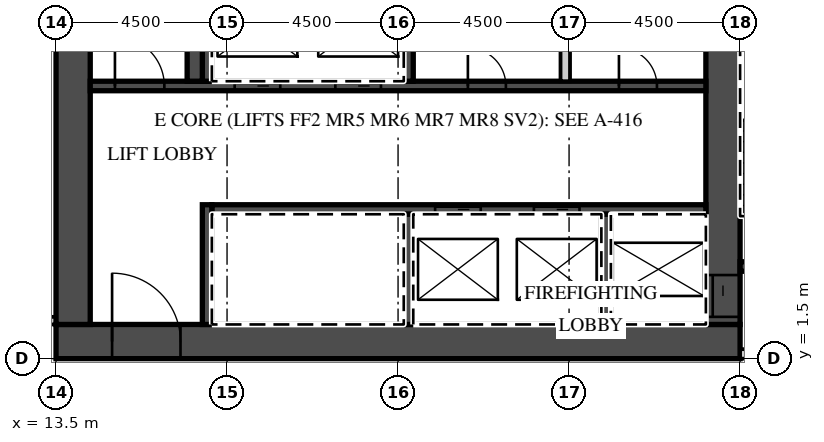
"""IFC4 building model, lengths in metres.
Left out: names, types, materials, properties, quantities, classifications, styles, units other than length and angle.
Written with IfcOpenShell. Run it as: python <this file> out.ifc"""

import sys

from ifc_helpers import new_model, si_unit, direction, frame, frame_2d, origin, place, context, subcontext, project, spatial, rectangle, extrude, element, fill, save


model = new_model("IFC4")
c1 = context("Model", 3, precision=1e-05, world=origin(), true_north=direction((0.0, 1.0)))
c2 = subcontext(c1, "Body", "Model", "MODEL_VIEW")
j1 = project(units=[si_unit("LENGTHUNIT", "METRE"), si_unit("PLANEANGLEUNIT", "RADIAN")], contexts=[c1])
p1 = place(None, origin())
s1 = spatial("IfcSite", under=j1, at=p1, CompositionType="ELEMENT")
p2 = place(p1, origin())
s2 = spatial("IfcBuilding", under=s1, at=p2, CompositionType="ELEMENT")
p3 = place(p2, frame((0.0, 0.0, 186.7)))
s3 = spatial("IfcBuildingStorey", under=s2, at=p3, CompositionType="ELEMENT", Elevation=186.7)
p4 = place(p3, frame((-13.5, 2.5, 0.0), z_axis=(0.0, 0.0, 1.0), x_axis=(1.0, 0.0, 0.0)))
e1 = element("IfcWall", 1, at=p4, inside=s3, PredefinedType="PARTITIONING", context=c2, shape_type="SweptSolid", body=[
    extrude(rectangle(XDim=27.0, YDim=0.2, at=frame_2d((13.5, 0.0))), origin(), (0.0, 0.0, 1.0), 3.02),
])
p5 = place(p4, frame((0.575, 0.0, 0.0)))
e2 = element("IfcOpeningElement", 2, at=p5, cuts=e1, PredefinedType="OPENING", context=c2, shape_type="SweptSolid", body=[
    extrude(rectangle(XDim=1.0, YDim=2.1, at=frame_2d((0.5, 1.05))), frame((0.0, 0.11, 0.0), z_axis=(0.0, -1.0, 0.0), x_axis=(1.0, 0.0, 0.0)), (0.0, 0.0, 1.0), 0.22),
])
p6 = place(p4, frame((9.863, 0.0, 0.0)))
e3 = element("IfcOpeningElement", 3, at=p6, cuts=e1, PredefinedType="OPENING", context=c2, shape_type="SweptSolid", body=[
    extrude(rectangle(XDim=1.2, YDim=2.1, at=frame_2d((0.6, 1.05))), frame((0.0, 0.11, 0.0), z_axis=(0.0, -1.0, 0.0), x_axis=(1.0, 0.0, 0.0)), (0.0, 0.0, 1.0), 0.22),
])
p7 = place(p4, frame((18.862, 0.0, 0.0)))
e4 = element("IfcOpeningElement", 4, at=p7, cuts=e1, PredefinedType="OPENING", context=c2, shape_type="SweptSolid", body=[
    extrude(rectangle(XDim=1.2, YDim=2.1, at=frame_2d((0.6, 1.05))), frame((0.0, 0.11, 0.0), z_axis=(0.0, -1.0, 0.0), x_axis=(1.0, 0.0, 0.0)), (0.0, 0.0, 1.0), 0.22),
])
p8 = place(p4, frame((25.425, 0.0, 0.0)))
e5 = element("IfcOpeningElement", 5, at=p8, cuts=e1, PredefinedType="OPENING", context=c2, shape_type="SweptSolid", body=[
    extrude(rectangle(XDim=1.0, YDim=2.1, at=frame_2d((0.5, 1.05))), frame((0.0, 0.11, 0.0), z_axis=(0.0, -1.0, 0.0), x_axis=(1.0, 0.0, 0.0)), (0.0, 0.0, 1.0), 0.22),
])
p9 = place(p3, frame((13.5, 1.95, 0.0), z_axis=(0.0, 0.0, 1.0), x_axis=(1.0, 0.0, 0.0)))
e6 = element("IfcWall", 6, at=p9, inside=s3, PredefinedType="SHEAR", context=c2, shape_type="SweptSolid", body=[
    extrude(rectangle(XDim=18.0, YDim=0.9, at=frame_2d((9.0, 0.0))), origin(), (0.0, 0.0, 1.0), 3.02),
])
p10 = place(p9, frame((1.475, 0.0, 0.0)))
e7 = element("IfcOpeningElement", 7, at=p10, cuts=e6, PredefinedType="OPENING", context=c2, shape_type="SweptSolid", body=[
    extrude(rectangle(XDim=1.8, YDim=2.1, at=frame_2d((0.9, 1.05))), frame((0.0, 0.46, 0.0), z_axis=(0.0, -1.0, 0.0), x_axis=(1.0, 0.0, 0.0)), (0.0, 0.0, 1.0), 0.92),
])
p11 = place(p3, frame((31.05, 2.4, 0.0), z_axis=(0.0, 0.0, 1.0), x_axis=(0.0, 1.0, 0.0)))
e8 = element("IfcWall", 8, at=p11, inside=s3, PredefinedType="SHEAR", context=c2, shape_type="SweptSolid", body=[
    extrude(rectangle(XDim=12.8, YDim=0.9, at=frame_2d((6.4, 0.0))), origin(), (0.0, 0.0, 1.0), 3.02),
])
p12 = place(p11, frame((0.2, 0.0, 0.0)))
e9 = element("IfcOpeningElement", 9, at=p12, cuts=e8, PredefinedType="OPENING", context=c2, shape_type="SweptSolid", body=[
    extrude(rectangle(XDim=1.1, YDim=2.1, at=frame_2d((0.55, 1.05))), frame((0.0, 0.46, 0.0), z_axis=(0.0, -1.0, 0.0), x_axis=(1.0, 0.0, 0.0)), (0.0, 0.0, 1.0), 0.92),
])
p13 = place(p3, frame((13.95, 2.4, 0.0), z_axis=(0.0, 0.0, 1.0), x_axis=(0.0, 1.0, 0.0)))
e10 = element("IfcWall", 10, at=p13, inside=s3, PredefinedType="SHEAR", context=c2, shape_type="SweptSolid", body=[
    extrude(rectangle(XDim=12.2, YDim=0.9, at=frame_2d((6.1, 0.0))), origin(), (0.0, 0.0, 1.0), 3.02),
])
p14 = place(p3, frame((17.6, 5.425, 0.0), z_axis=(0.0, 0.0, 1.0), x_axis=(1.0, 0.0, 0.0)))
e11 = element("IfcWall", 11, at=p14, inside=s3, PredefinedType="SHEAR", context=c2, shape_type="SweptSolid", body=[
    extrude(rectangle(XDim=13.0, YDim=0.25, at=frame_2d((6.5, 0.0))), origin(), (0.0, 0.0, 1.0), 3.02),
])
p15 = place(p14, frame((8.475, 0.0, 0.0)))
e12 = element("IfcOpeningElement", 12, at=p15, cuts=e11, PredefinedType="OPENING", context=c2, shape_type="SweptSolid", body=[
    extrude(rectangle(XDim=1.2, YDim=2.1, at=frame_2d((0.6, 1.05))), frame((0.0, 0.135, 0.0), z_axis=(0.0, -1.0, 0.0), x_axis=(1.0, 0.0, 0.0)), (0.0, 0.0, 1.0), 0.27),
])
p16 = place(p14, frame((5.875, 0.0, 0.0)))
e13 = element("IfcOpeningElement", 13, at=p16, cuts=e11, PredefinedType="OPENING", context=c2, shape_type="SweptSolid", body=[
    extrude(rectangle(XDim=1.2, YDim=2.1, at=frame_2d((0.6, 1.05))), frame((0.0, 0.135, 0.0), z_axis=(0.0, -1.0, 0.0), x_axis=(1.0, 0.0, 0.0)), (0.0, 0.0, 1.0), 0.27),
])
p17 = place(p3, frame((17.475, 2.4, 0.0), z_axis=(0.0, 0.0, 1.0), x_axis=(0.0, 1.0, 0.0)))
e14 = element("IfcWall", 14, at=p17, inside=s3, PredefinedType="SHEAR", context=c2, shape_type="SweptSolid", body=[
    extrude(rectangle(XDim=3.15, YDim=0.25, at=frame_2d((1.575, 0.0))), origin(), (0.0, 0.0, 1.0), 3.02),
])
for number, where, z_axis, x_axis in (
    (15, (27.975, 2.4, 0.0), (0.0, 0.0, 1.0), (0.0, 1.0, 0.0)),
    (16, (22.775, 2.4, 0.0), (0.0, 0.0, 1.0), (0.0, 1.0, 0.0)),
):
    element("IfcWall", number, at=place(p3, frame(where, z_axis=z_axis, x_axis=x_axis)), inside=s3, PredefinedType="SHEAR", context=c2, shape_type="SweptSolid", body=[
        extrude(rectangle(XDim=2.9, YDim=0.25, at=frame_2d((1.45, 0.0))), origin(), (0.0, 0.0, 1.0), 3.02),
    ])
p18 = place(p3, frame((14.4, 8.675, 0.0), z_axis=(0.0, 0.0, 1.0), x_axis=(1.0, 0.0, 0.0)))
e17 = element("IfcWall", 17, at=p18, inside=s3, PredefinedType="SHEAR", context=c2, shape_type="SweptSolid", body=[
    extrude(rectangle(XDim=16.2, YDim=0.25, at=frame_2d((8.1, 0.0))), origin(), (0.0, 0.0, 1.0), 3.02),
])
p19 = place(p18, frame((6.45, 0.0, 0.0)))
e18 = element("IfcOpeningElement", 18, at=p19, cuts=e17, PredefinedType="OPENING", context=c2, shape_type="SweptSolid", body=[
    extrude(rectangle(XDim=1.2, YDim=2.1, at=frame_2d((0.6, 1.05))), frame((0.0, 0.135, 0.0), z_axis=(0.0, -1.0, 0.0), x_axis=(1.0, 0.0, 0.0)), (0.0, 0.0, 1.0), 0.27),
])
p20 = place(p18, frame((3.8, 0.0, 0.0)))
e19 = element("IfcOpeningElement", 19, at=p20, cuts=e17, PredefinedType="OPENING", context=c2, shape_type="SweptSolid", body=[
    extrude(rectangle(XDim=1.2, YDim=2.1, at=frame_2d((0.6, 1.05))), frame((0.0, 0.135, 0.0), z_axis=(0.0, -1.0, 0.0), x_axis=(1.0, 0.0, 0.0)), (0.0, 0.0, 1.0), 0.27),
])
p21 = place(p18, frame((0.65, 0.0, 0.0)))
e20 = element("IfcOpeningElement", 20, at=p21, cuts=e17, PredefinedType="OPENING", context=c2, shape_type="SweptSolid", body=[
    extrude(rectangle(XDim=1.3, YDim=2.1, at=frame_2d((0.65, 1.05))), frame((0.0, 0.135, 0.0), z_axis=(0.0, -1.0, 0.0), x_axis=(1.0, 0.0, 0.0)), (0.0, 0.0, 1.0), 0.27),
])
p22 = place(p18, frame((13.913, 0.0, 0.0)))
e21 = element("IfcOpeningElement", 21, at=p22, cuts=e17, PredefinedType="OPENING", context=c2, shape_type="SweptSolid", body=[
    extrude(rectangle(XDim=1.0, YDim=2.1, at=frame_2d((0.5, 1.05))), frame((0.0, 0.135, 0.0), z_axis=(0.0, -1.0, 0.0), x_axis=(1.0, 0.0, 0.0)), (0.0, 0.0, 1.0), 0.27),
])
p23 = place(p18, frame((9.938, 0.0, 0.0)))
e22 = element("IfcOpeningElement", 22, at=p23, cuts=e17, PredefinedType="OPENING", context=c2, shape_type="SweptSolid", body=[
    extrude(rectangle(XDim=1.0, YDim=2.1, at=frame_2d((0.5, 1.05))), frame((0.0, 0.135, 0.0), z_axis=(0.0, -1.0, 0.0), x_axis=(1.0, 0.0, 0.0)), (0.0, 0.0, 1.0), 0.27),
])
for number, where, z_axis, x_axis in (
    (23, (17.475, 8.8, 0.0), (0.0, 0.0, 1.0), (0.0, 1.0, 0.0)),
    (24, (22.775, 8.8, 0.0), (0.0, 0.0, 1.0), (0.0, 1.0, 0.0)),
):
    element("IfcWall", number, at=place(p3, frame(where, z_axis=z_axis, x_axis=x_axis)), inside=s3, PredefinedType="SHEAR", context=c2, shape_type="SweptSolid", body=[
        extrude(rectangle(XDim=2.9, YDim=0.25, at=frame_2d((1.45, 0.0))), origin(), (0.0, 0.0, 1.0), 3.02),
    ])
p24 = place(p3, frame((26.9, 8.8, 0.0), z_axis=(0.0, 0.0, 1.0), x_axis=(0.0, 1.0, 0.0)))
e25 = element("IfcWall", 25, at=p24, inside=s3, PredefinedType="PARTITIONING", context=c2, shape_type="SweptSolid", body=[
    extrude(rectangle(XDim=2.9, YDim=0.25, at=frame_2d((1.45, 0.0))), origin(), (0.0, 0.0, 1.0), 3.02),
])
p25 = place(p3, frame((17.15, 8.8, 0.0), z_axis=(0.0, 0.0, 1.0), x_axis=(0.0, 1.0, 0.0)))
e26 = element("IfcWall", 26, at=p25, inside=s3, PredefinedType="SHEAR", context=c2, shape_type="SweptSolid", body=[
    extrude(rectangle(XDim=5.8, YDim=0.4, at=frame_2d((2.9, 0.0))), origin(), (0.0, 0.0, 1.0), 3.02),
])
p26 = place(p3, frame((31.5, 1.625, 0.0), z_axis=(0.0, 0.0, 1.0), x_axis=(1.0, 0.0, 0.0)))
e27 = element("IfcWall", 27, at=p26, inside=s3, PredefinedType="PARTITIONING", context=c2, shape_type="SweptSolid", body=[
    extrude(rectangle(XDim=8.035, YDim=0.25, at=frame_2d((4.018, 0.0))), origin(), (0.0, 0.0, 1.0), 3.02),
])
p27 = place(p26, frame((0.625, 0.0, 0.0)))
e28 = element("IfcOpeningElement", 28, at=p27, cuts=e27, PredefinedType="OPENING", context=c2, shape_type="SweptSolid", body=[
    extrude(rectangle(XDim=1.3, YDim=2.1, at=frame_2d((0.65, 1.05))), frame((0.0, 0.135, 0.0), z_axis=(0.0, -1.0, 0.0), x_axis=(1.0, 0.0, 0.0)), (0.0, 0.0, 1.0), 0.27),
])
p28 = place(p26, frame((3.25, 0.0, 0.0)))
e29 = element("IfcOpeningElement", 29, at=p28, cuts=e27, PredefinedType="OPENING", context=c2, shape_type="SweptSolid", body=[
    extrude(rectangle(XDim=1.1, YDim=2.1, at=frame_2d((0.55, 1.05))), frame((0.0, 0.135, 0.0), z_axis=(0.0, -1.0, 0.0), x_axis=(1.0, 0.0, 0.0)), (0.0, 0.0, 1.0), 0.27),
])
p29 = place(p3, frame((31.5, 3.925, 0.0), z_axis=(0.0, 0.0, 1.0), x_axis=(1.0, 0.0, 0.0)))
e30 = element("IfcWall", 30, at=p29, inside=s3, PredefinedType="SHEAR", context=c2, shape_type="SweptSolid", body=[
    extrude(rectangle(XDim=2.55, YDim=0.25, at=frame_2d((1.275, 0.0))), origin(), (0.0, 0.0, 1.0), 3.02),
])
p30 = place(p29, frame((0.625, 0.0, 0.0)))
e31 = element("IfcOpeningElement", 31, at=p30, cuts=e30, PredefinedType="OPENING", context=c2, shape_type="SweptSolid", body=[
    extrude(rectangle(XDim=1.3, YDim=2.1, at=frame_2d((0.65, 1.05))), frame((0.0, 0.135, 0.0), z_axis=(0.0, -1.0, 0.0), x_axis=(1.0, 0.0, 0.0)), (0.0, 0.0, 1.0), 0.27),
])
p31 = place(p19, origin())
e32 = element("IfcDoor", 32, at=p31, inside=s3, OperationType="SLIDING_TO_LEFT", PredefinedType="DOOR", context=c2, shape_type="SweptSolid", body=[
    extrude(rectangle(XDim=1.2, YDim=2.1, at=frame_2d((0.6, 1.05))), frame((0.0, 0.025, 0.0), z_axis=(0.0, -1.0, 0.0), x_axis=(1.0, 0.0, 0.0)), (0.0, 0.0, 1.0), 0.05),
])
fill(e18, e32)
p32 = place(p20, origin())
e33 = element("IfcDoor", 33, at=p32, inside=s3, OperationType="SLIDING_TO_RIGHT", PredefinedType="DOOR", context=c2, shape_type="SweptSolid", body=[
    extrude(rectangle(XDim=1.2, YDim=2.1, at=frame_2d((0.6, 1.05))), frame((0.0, 0.025, 0.0), z_axis=(0.0, -1.0, 0.0), x_axis=(1.0, 0.0, 0.0)), (0.0, 0.0, 1.0), 0.05),
])
fill(e19, e33)
p33 = place(p15, origin())
e34 = element("IfcDoor", 34, at=p33, inside=s3, OperationType="SLIDING_TO_LEFT", PredefinedType="DOOR", context=c2, shape_type="SweptSolid", body=[
    extrude(rectangle(XDim=1.2, YDim=2.1, at=frame_2d((0.6, 1.05))), frame((0.0, 0.025, 0.0), z_axis=(0.0, -1.0, 0.0), x_axis=(1.0, 0.0, 0.0)), (0.0, 0.0, 1.0), 0.05),
])
fill(e12, e34)
p34 = place(p16, origin())
e35 = element("IfcDoor", 35, at=p34, inside=s3, OperationType="SLIDING_TO_RIGHT", PredefinedType="DOOR", context=c2, shape_type="SweptSolid", body=[
    extrude(rectangle(XDim=1.2, YDim=2.1, at=frame_2d((0.6, 1.05))), frame((0.0, 0.025, 0.0), z_axis=(0.0, -1.0, 0.0), x_axis=(1.0, 0.0, 0.0)), (0.0, 0.0, 1.0), 0.05),
])
fill(e13, e35)
p35 = place(p12, origin())
e36 = element("IfcDoor", 36, at=p35, inside=s3, OperationType="SLIDING_TO_LEFT", PredefinedType="DOOR", context=c2, shape_type="SweptSolid", body=[
    extrude(rectangle(XDim=1.1, YDim=2.1, at=frame_2d((0.55, 1.05))), frame((0.0, 0.025, 0.0), z_axis=(0.0, -1.0, 0.0), x_axis=(1.0, 0.0, 0.0)), (0.0, 0.0, 1.0), 0.05),
])
fill(e9, e36)
p36 = place(p10, origin())
e37 = element("IfcDoor", 37, at=p36, inside=s3, OperationType="DOUBLE_DOOR_DOUBLE_SWING", PredefinedType="DOOR", context=c2, shape_type="SweptSolid", body=[
    extrude(rectangle(XDim=1.8, YDim=2.1, at=frame_2d((0.9, 1.05))), frame((0.0, 0.025, 0.0), z_axis=(0.0, -1.0, 0.0), x_axis=(1.0, 0.0, 0.0)), (0.0, 0.0, 1.0), 0.05),
])
fill(e7, e37)
p37 = place(p21, origin())
e38 = element("IfcDoor", 38, at=p37, inside=s3, OperationType="SINGLE_SWING_LEFT", PredefinedType="DOOR", context=c2, shape_type="SweptSolid", body=[
    extrude(rectangle(XDim=1.3, YDim=2.1, at=frame_2d((0.65, 1.05))), frame((0.0, 0.025, 0.0), z_axis=(0.0, -1.0, 0.0), x_axis=(1.0, 0.0, 0.0)), (0.0, 0.0, 1.0), 0.05),
])
fill(e20, e38)
p38 = place(p22, origin())
e39 = element("IfcDoor", 39, at=p38, inside=s3, OperationType="SINGLE_SWING_LEFT", PredefinedType="DOOR", context=c2, shape_type="SweptSolid", body=[
    extrude(rectangle(XDim=1.0, YDim=2.1, at=frame_2d((0.5, 1.05))), frame((0.0, 0.025, 0.0), z_axis=(0.0, -1.0, 0.0), x_axis=(1.0, 0.0, 0.0)), (0.0, 0.0, 1.0), 0.05),
])
fill(e21, e39)
p39 = place(p23, origin())
e40 = element("IfcDoor", 40, at=p39, inside=s3, OperationType="SINGLE_SWING_LEFT", PredefinedType="DOOR", context=c2, shape_type="SweptSolid", body=[
    extrude(rectangle(XDim=1.0, YDim=2.1, at=frame_2d((0.5, 1.05))), frame((0.0, 0.025, 0.0), z_axis=(0.0, -1.0, 0.0), x_axis=(1.0, 0.0, 0.0)), (0.0, 0.0, 1.0), 0.05),
])
fill(e22, e40)
save(model, sys.argv[1])
